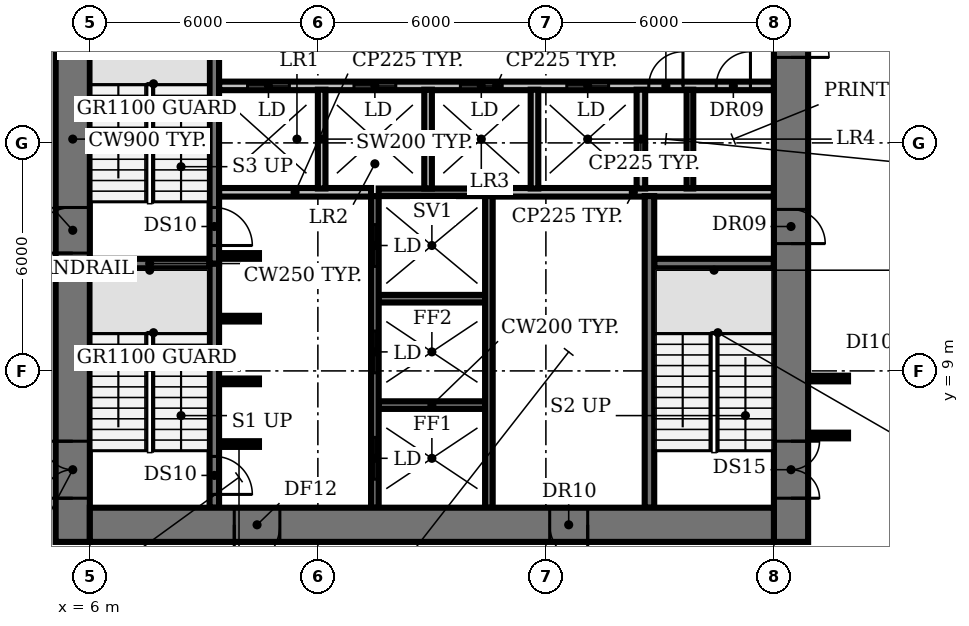
"""IFC4 building model, lengths in metres.
Left out: names, types, materials, properties, quantities, classifications, styles, units other than length and angle.
Written with IfcOpenShell. Run it as: python <this file> out.ifc"""

import sys

from ifc_helpers import new_model, si_unit, direction, frame, frame_2d, origin, place, context, subcontext, project, spatial, rectangle, extrude, element, fill, save


model = new_model("IFC4")
c1 = context("Model", 3, precision=1e-05, world=origin(), true_north=direction((0.0, 1.0)))
c2 = subcontext(c1, "Body", "Model", "MODEL_VIEW")
j1 = project(units=[si_unit("LENGTHUNIT", "METRE"), si_unit("PLANEANGLEUNIT", "RADIAN")], contexts=[c1])
p1 = place(None, origin())
s1 = spatial("IfcSite", under=j1, at=p1, CompositionType="ELEMENT")
p2 = place(p1, origin())
s2 = spatial("IfcBuilding", under=s1, at=p2, CompositionType="ELEMENT")
p3 = place(p2, frame((0.0, 0.0, 66.8)))
s3 = spatial("IfcBuildingStorey", under=s2, at=p3, CompositionType="ELEMENT", Elevation=66.8)
p4 = place(p3, frame((9.4, 7.075, 0.0), z_axis=(0.0, 0.0, 1.0), x_axis=(1.0, 0.0, 0.0)))
e1 = element("IfcWall", 1, at=p4, inside=s3, PredefinedType="SHEAR", context=c2, shape_type="SweptSolid", body=[
    extrude(rectangle(XDim=1.05, YDim=0.15, at=frame_2d((0.525, 0.0))), origin(), (0.0, 0.0, 1.0), 3.85),
])
p5 = place(p3, frame((13.6, 8.1, 0.0), z_axis=(0.0, 0.0, 1.0), x_axis=(1.0, 0.0, 0.0)))
e2 = element("IfcWall", 2, at=p5, inside=s3, PredefinedType="SHEAR", context=c2, shape_type="SweptSolid", body=[
    extrude(rectangle(XDim=2.8, YDim=0.2, at=frame_2d((1.4, 0.0))), origin(), (0.0, 0.0, 1.0), 3.85),
])
for number, where, z_axis, x_axis in (
    (3, (9.4, 8.725, 0.0), (0.0, 0.0, 1.0), (1.0, 0.0, 0.0)),
    (4, (9.4, 10.375, 0.0), (0.0, 0.0, 1.0), (1.0, 0.0, 0.0)),
):
    element("IfcWall", number, at=place(p3, frame(where, z_axis=z_axis, x_axis=x_axis)), inside=s3, PredefinedType="SHEAR", context=c2, shape_type="SweptSolid", body=[
        extrude(rectangle(XDim=1.05, YDim=0.15, at=frame_2d((0.525, 0.0))), origin(), (0.0, 0.0, 1.0), 3.85),
    ])
p6 = place(p3, frame((13.6, 10.9, 0.0), z_axis=(0.0, 0.0, 1.0), x_axis=(1.0, 0.0, 0.0)))
e5 = element("IfcWall", 5, at=p6, inside=s3, PredefinedType="SHEAR", context=c2, shape_type="SweptSolid", body=[
    extrude(rectangle(XDim=2.8, YDim=0.2, at=frame_2d((1.4, 0.0))), origin(), (0.0, 0.0, 1.0), 3.85),
])
for number, where, z_axis, x_axis in (
    (6, (6.0, 11.825, 0.0), (0.0, 0.0, 1.0), (1.0, 0.0, 0.0)),
    (7, (20.85, 11.825, 0.0), (0.0, 0.0, 1.0), (1.0, 0.0, 0.0)),
):
    element("IfcWall", number, at=place(p3, frame(where, z_axis=z_axis, x_axis=x_axis)), inside=s3, PredefinedType="SHEAR", context=c2, shape_type="SweptSolid", body=[
        extrude(rectangle(XDim=3.15, YDim=0.25, at=frame_2d((1.575, 0.0))), origin(), (0.0, 0.0, 1.0), 3.85),
    ])
p7 = place(p3, frame((9.4, 12.025, 0.0), z_axis=(0.0, 0.0, 1.0), x_axis=(1.0, 0.0, 0.0)))
e8 = element("IfcWall", 8, at=p7, inside=s3, PredefinedType="SHEAR", context=c2, shape_type="SweptSolid", body=[
    extrude(rectangle(XDim=1.05, YDim=0.15, at=frame_2d((0.525, 0.0))), origin(), (0.0, 0.0, 1.0), 3.85),
])
p8 = place(p3, frame((9.4, 13.7, 0.0), z_axis=(0.0, 0.0, 1.0), x_axis=(1.0, 0.0, 0.0)))
e9 = element("IfcWall", 9, at=p8, inside=s3, PredefinedType="PARTITIONING", context=c2, shape_type="SweptSolid", body=[
    extrude(rectangle(XDim=4.0, YDim=0.225, at=frame_2d((2.0, 0.0))), origin(), (0.0, 0.0, 1.0), 3.85),
])
p9 = place(p3, frame((13.6, 13.7, 0.0), z_axis=(0.0, 0.0, 1.0), x_axis=(1.0, 0.0, 0.0)))
e10 = element("IfcWall", 10, at=p9, inside=s3, PredefinedType="SHEAR", context=c2, shape_type="SweptSolid", body=[
    extrude(rectangle(XDim=2.8, YDim=0.2, at=frame_2d((1.4, 0.0))), origin(), (0.0, 0.0, 1.0), 3.85),
])
p10 = place(p3, frame((16.6, 13.7, 0.0), z_axis=(0.0, 0.0, 1.0), x_axis=(1.0, 0.0, 0.0)))
e11 = element("IfcWall", 11, at=p10, inside=s3, PredefinedType="PARTITIONING", context=c2, shape_type="SweptSolid", body=[
    extrude(rectangle(XDim=7.4, YDim=0.225, at=frame_2d((3.7, 0.0))), origin(), (0.0, 0.0, 1.0), 3.85),
])
p11 = place(p3, frame((9.4, 16.5, 0.0), z_axis=(0.0, 0.0, 1.0), x_axis=(1.0, 0.0, 0.0)))
e12 = element("IfcWall", 12, at=p11, inside=s3, PredefinedType="PARTITIONING", context=c2, shape_type="SweptSolid", body=[
    extrude(rectangle(XDim=14.6, YDim=0.225, at=frame_2d((7.3, 0.0))), origin(), (0.0, 0.0, 1.0), 3.85),
])
p12 = place(p11, frame((0.75, 0.0, 0.0)))
e13 = element("IfcOpeningElement", 13, at=p12, cuts=e12, PredefinedType="OPENING", context=c2, shape_type="SweptSolid", body=[
    extrude(rectangle(XDim=1.1, YDim=2.1, at=frame_2d((0.55, 1.05))), frame((0.0, 0.123, 0.0), z_axis=(0.0, -1.0, 0.0), x_axis=(1.0, 0.0, 0.0)), (0.0, 0.0, 1.0), 0.245),
])
p13 = place(p11, frame((3.55, 0.0, 0.0)))
e14 = element("IfcOpeningElement", 14, at=p13, cuts=e12, PredefinedType="OPENING", context=c2, shape_type="SweptSolid", body=[
    extrude(rectangle(XDim=1.1, YDim=2.1, at=frame_2d((0.55, 1.05))), frame((0.0, 0.123, 0.0), z_axis=(0.0, -1.0, 0.0), x_axis=(1.0, 0.0, 0.0)), (0.0, 0.0, 1.0), 0.245),
])
p14 = place(p11, frame((6.35, 0.0, 0.0)))
e15 = element("IfcOpeningElement", 15, at=p14, cuts=e12, PredefinedType="OPENING", context=c2, shape_type="SweptSolid", body=[
    extrude(rectangle(XDim=1.1, YDim=2.1, at=frame_2d((0.55, 1.05))), frame((0.0, 0.123, 0.0), z_axis=(0.0, -1.0, 0.0), x_axis=(1.0, 0.0, 0.0)), (0.0, 0.0, 1.0), 0.245),
])
p15 = place(p11, frame((9.15, 0.0, 0.0)))
e16 = element("IfcOpeningElement", 16, at=p15, cuts=e12, PredefinedType="OPENING", context=c2, shape_type="SweptSolid", body=[
    extrude(rectangle(XDim=1.1, YDim=2.1, at=frame_2d((0.55, 1.05))), frame((0.0, 0.123, 0.0), z_axis=(0.0, -1.0, 0.0), x_axis=(1.0, 0.0, 0.0)), (0.0, 0.0, 1.0), 0.245),
])
p16 = place(p11, frame((11.308, 0.0, 0.0)))
e17 = element("IfcOpeningElement", 17, at=p16, cuts=e12, PredefinedType="OPENING", context=c2, shape_type="SweptSolid", body=[
    extrude(rectangle(XDim=0.9, YDim=2.1, at=frame_2d((0.45, 1.05))), frame((0.0, 0.123, 0.0), z_axis=(0.0, -1.0, 0.0), x_axis=(1.0, 0.0, 0.0)), (0.0, 0.0, 1.0), 0.245),
])
p17 = place(p11, frame((13.083, 0.0, 0.0)))
e18 = element("IfcOpeningElement", 18, at=p17, cuts=e12, PredefinedType="OPENING", context=c2, shape_type="SweptSolid", body=[
    extrude(rectangle(XDim=0.9, YDim=2.1, at=frame_2d((0.45, 1.05))), frame((0.0, 0.123, 0.0), z_axis=(0.0, -1.0, 0.0), x_axis=(1.0, 0.0, 0.0)), (0.0, 0.0, 1.0), 0.245),
])
p18 = place(p3, frame((9.275, 11.825, 0.0), z_axis=(0.0, 0.0, 1.0), x_axis=(0.0, -1.0, 0.0)))
e19 = element("IfcWall", 19, at=p18, inside=s3, PredefinedType="SHEAR", context=c2, shape_type="SweptSolid", body=[
    extrude(rectangle(XDim=6.425, YDim=0.25, at=frame_2d((3.212, 0.0))), origin(), (0.0, 0.0, 1.0), 3.85),
])
p19 = place(p18, frame((5.075, 0.0, 0.0)))
e20 = element("IfcOpeningElement", 20, at=p19, cuts=e19, PredefinedType="OPENING", context=c2, shape_type="SweptSolid", body=[
    extrude(rectangle(XDim=1.0, YDim=2.1, at=frame_2d((0.5, 1.05))), frame((0.0, 0.135, 0.0), z_axis=(0.0, -1.0, 0.0), x_axis=(1.0, 0.0, 0.0)), (0.0, 0.0, 1.0), 0.27),
])
p20 = place(p3, frame((9.275, 18.375, 0.0), z_axis=(0.0, 0.0, 1.0), x_axis=(0.0, -1.0, 0.0)))
e21 = element("IfcWall", 21, at=p20, inside=s3, PredefinedType="SHEAR", context=c2, shape_type="SweptSolid", body=[
    extrude(rectangle(XDim=6.55, YDim=0.25, at=frame_2d((3.275, 0.0))), origin(), (0.0, 0.0, 1.0), 3.85),
])
p21 = place(p20, frame((5.075, 0.0, 0.0)))
e22 = element("IfcOpeningElement", 22, at=p21, cuts=e21, PredefinedType="OPENING", context=c2, shape_type="SweptSolid", body=[
    extrude(rectangle(XDim=1.0, YDim=2.1, at=frame_2d((0.5, 1.05))), frame((0.0, 0.135, 0.0), z_axis=(0.0, -1.0, 0.0), x_axis=(1.0, 0.0, 0.0)), (0.0, 0.0, 1.0), 0.27),
])
p22 = place(p3, frame((12.1, 13.8, 0.0), z_axis=(0.0, 0.0, 1.0), x_axis=(0.0, 1.0, 0.0)))
e23 = element("IfcWall", 23, at=p22, inside=s3, PredefinedType="SOLIDWALL", context=c2, shape_type="SweptSolid", body=[
    extrude(rectangle(XDim=2.6, YDim=0.2, at=frame_2d((1.3, 0.0))), origin(), (0.0, 0.0, 1.0), 3.85),
])
p23 = place(p3, frame((13.5, 5.4, 0.0), z_axis=(0.0, 0.0, 1.0), x_axis=(0.0, 1.0, 0.0)))
e24 = element("IfcWall", 24, at=p23, inside=s3, PredefinedType="SHEAR", context=c2, shape_type="SweptSolid", body=[
    extrude(rectangle(XDim=8.2, YDim=0.2, at=frame_2d((4.1, 0.0))), origin(), (0.0, 0.0, 1.0), 3.85),
])
p24 = place(p23, frame((0.75, 0.0, 0.0)))
e25 = element("IfcOpeningElement", 25, at=p24, cuts=e24, PredefinedType="OPENING", context=c2, shape_type="SweptSolid", body=[
    extrude(rectangle(XDim=1.1, YDim=2.1, at=frame_2d((0.55, 1.05))), frame((0.0, 0.11, 0.0), z_axis=(0.0, -1.0, 0.0), x_axis=(1.0, 0.0, 0.0)), (0.0, 0.0, 1.0), 0.22),
])
p25 = place(p23, frame((3.55, 0.0, 0.0)))
e26 = element("IfcOpeningElement", 26, at=p25, cuts=e24, PredefinedType="OPENING", context=c2, shape_type="SweptSolid", body=[
    extrude(rectangle(XDim=1.1, YDim=2.1, at=frame_2d((0.55, 1.05))), frame((0.0, 0.11, 0.0), z_axis=(0.0, -1.0, 0.0), x_axis=(1.0, 0.0, 0.0)), (0.0, 0.0, 1.0), 0.22),
])
p26 = place(p23, frame((6.35, 0.0, 0.0)))
e27 = element("IfcOpeningElement", 27, at=p26, cuts=e24, PredefinedType="OPENING", context=c2, shape_type="SweptSolid", body=[
    extrude(rectangle(XDim=1.1, YDim=2.1, at=frame_2d((0.55, 1.05))), frame((0.0, 0.11, 0.0), z_axis=(0.0, -1.0, 0.0), x_axis=(1.0, 0.0, 0.0)), (0.0, 0.0, 1.0), 0.22),
])
p27 = place(p3, frame((14.9, 13.8, 0.0), z_axis=(0.0, 0.0, 1.0), x_axis=(0.0, 1.0, 0.0)))
e28 = element("IfcWall", 28, at=p27, inside=s3, PredefinedType="SOLIDWALL", context=c2, shape_type="SweptSolid", body=[
    extrude(rectangle(XDim=2.6, YDim=0.2, at=frame_2d((1.3, 0.0))), origin(), (0.0, 0.0, 1.0), 3.85),
])
p28 = place(p3, frame((16.5, 5.4, 0.0), z_axis=(0.0, 0.0, 1.0), x_axis=(0.0, 1.0, 0.0)))
e29 = element("IfcWall", 29, at=p28, inside=s3, PredefinedType="SHEAR", context=c2, shape_type="SweptSolid", body=[
    extrude(rectangle(XDim=8.2, YDim=0.2, at=frame_2d((4.1, 0.0))), origin(), (0.0, 0.0, 1.0), 3.85),
])
p29 = place(p3, frame((17.7, 13.8, 0.0), z_axis=(0.0, 0.0, 1.0), x_axis=(0.0, 1.0, 0.0)))
e30 = element("IfcWall", 30, at=p29, inside=s3, PredefinedType="SOLIDWALL", context=c2, shape_type="SweptSolid", body=[
    extrude(rectangle(XDim=2.6, YDim=0.2, at=frame_2d((1.3, 0.0))), origin(), (0.0, 0.0, 1.0), 3.85),
])
p30 = place(p3, frame((20.5, 13.8, 0.0), z_axis=(0.0, 0.0, 1.0), x_axis=(0.0, 1.0, 0.0)))
e31 = element("IfcWall", 31, at=p30, inside=s3, PredefinedType="PARTITIONING", context=c2, shape_type="SweptSolid", body=[
    extrude(rectangle(XDim=2.6, YDim=0.225, at=frame_2d((1.3, 0.0))), origin(), (0.0, 0.0, 1.0), 3.85),
])
p31 = place(p3, frame((20.725, 5.4, 0.0), z_axis=(0.0, 0.0, 1.0), x_axis=(0.0, 1.0, 0.0)))
e32 = element("IfcWall", 32, at=p31, inside=s3, PredefinedType="SHEAR", context=c2, shape_type="SweptSolid", body=[
    extrude(rectangle(XDim=8.2, YDim=0.25, at=frame_2d((4.1, 0.0))), origin(), (0.0, 0.0, 1.0), 3.85),
])
p32 = place(p3, frame((21.79, 13.8, 0.0), z_axis=(0.0, 0.0, 1.0), x_axis=(0.0, 1.0, 0.0)))
e33 = element("IfcWall", 33, at=p32, inside=s3, PredefinedType="PARTITIONING", context=c2, shape_type="SweptSolid", body=[
    extrude(rectangle(XDim=2.6, YDim=0.175, at=frame_2d((1.3, 0.0))), origin(), (0.0, 0.0, 1.0), 3.85),
])
p33 = place(p3, frame((5.55, 4.5, 0.0), z_axis=(0.0, 0.0, 1.0), x_axis=(0.0, 1.0, 0.0)))
e34 = element("IfcWall", 34, at=p33, inside=s3, PredefinedType="SHEAR", context=c2, shape_type="SweptSolid", body=[
    extrude(rectangle(XDim=21.2, YDim=0.9, at=frame_2d((10.6, 0.0))), origin(), (0.0, 0.0, 1.0), 3.85),
])
p34 = place(p33, frame((1.15, 0.0, 0.0)))
e35 = element("IfcOpeningElement", 35, at=p34, cuts=e34, PredefinedType="OPENING", context=c2, shape_type="SweptSolid", body=[
    extrude(rectangle(XDim=1.5, YDim=2.1, at=frame_2d((0.75, 1.05))), frame((0.0, 0.46, 0.0), z_axis=(0.0, -1.0, 0.0), x_axis=(1.0, 0.0, 0.0)), (0.0, 0.0, 1.0), 0.92),
])
p35 = place(p33, frame((7.6, 0.0, 0.0)))
e36 = element("IfcOpeningElement", 36, at=p35, cuts=e34, PredefinedType="OPENING", context=c2, shape_type="SweptSolid", body=[
    extrude(rectangle(XDim=1.2, YDim=2.1, at=frame_2d((0.6, 1.05))), frame((0.0, 0.46, 0.0), z_axis=(0.0, -1.0, 0.0), x_axis=(1.0, 0.0, 0.0)), (0.0, 0.0, 1.0), 0.92),
])
p36 = place(p33, frame((14.15, 0.0, 0.0)))
e37 = element("IfcOpeningElement", 37, at=p36, cuts=e34, PredefinedType="OPENING", context=c2, shape_type="SweptSolid", body=[
    extrude(rectangle(XDim=1.2, YDim=2.1, at=frame_2d((0.6, 1.05))), frame((0.0, 0.46, 0.0), z_axis=(0.0, -1.0, 0.0), x_axis=(1.0, 0.0, 0.0)), (0.0, 0.0, 1.0), 0.92),
])
p37 = place(p3, frame((24.45, 25.7, 0.0), z_axis=(0.0, 0.0, 1.0), x_axis=(0.0, -1.0, 0.0)))
e38 = element("IfcWall", 38, at=p37, inside=s3, PredefinedType="SHEAR", context=c2, shape_type="SweptSolid", body=[
    extrude(rectangle(XDim=21.2, YDim=0.9, at=frame_2d((10.6, 0.0))), origin(), (0.0, 0.0, 1.0), 3.85),
])
p38 = place(p37, frame((18.55, 0.0, 0.0)))
e39 = element("IfcOpeningElement", 39, at=p38, cuts=e38, PredefinedType="OPENING", context=c2, shape_type="SweptSolid", body=[
    extrude(rectangle(XDim=1.5, YDim=2.1, at=frame_2d((0.75, 1.05))), frame((0.0, 0.46, 0.0), z_axis=(0.0, -1.0, 0.0), x_axis=(1.0, 0.0, 0.0)), (0.0, 0.0, 1.0), 0.92),
])
p39 = place(p37, frame((12.45, 0.0, 0.0)))
e40 = element("IfcOpeningElement", 40, at=p39, cuts=e38, PredefinedType="OPENING", context=c2, shape_type="SweptSolid", body=[
    extrude(rectangle(XDim=0.9, YDim=2.1, at=frame_2d((0.45, 1.05))), frame((0.0, 0.46, 0.0), z_axis=(0.0, -1.0, 0.0), x_axis=(1.0, 0.0, 0.0)), (0.0, 0.0, 1.0), 0.92),
])
p40 = place(p37, frame((6.45, 0.0, 0.0)))
e41 = element("IfcOpeningElement", 41, at=p40, cuts=e38, PredefinedType="OPENING", context=c2, shape_type="SweptSolid", body=[
    extrude(rectangle(XDim=2.0, YDim=2.1, at=frame_2d((1.0, 1.05))), frame((0.0, 0.46, 0.0), z_axis=(0.0, -1.0, 0.0), x_axis=(1.0, 0.0, 0.0)), (0.0, 0.0, 1.0), 0.92),
])
p41 = place(p3, frame((24.0, 4.95, 0.0), z_axis=(0.0, 0.0, 1.0), x_axis=(-1.0, 0.0, 0.0)))
e42 = element("IfcWall", 42, at=p41, inside=s3, PredefinedType="SHEAR", context=c2, shape_type="SweptSolid", body=[
    extrude(rectangle(XDim=18.0, YDim=0.9, at=frame_2d((9.0, 0.0))), origin(), (0.0, 0.0, 1.0), 3.85),
])
p42 = place(p41, frame((13.0, 0.0, 0.0)))
e43 = element("IfcOpeningElement", 43, at=p42, cuts=e42, PredefinedType="OPENING", context=c2, shape_type="SweptSolid", body=[
    extrude(rectangle(XDim=1.2, YDim=2.1, at=frame_2d((0.6, 1.05))), frame((0.0, 0.46, 0.0), z_axis=(0.0, -1.0, 0.0), x_axis=(1.0, 0.0, 0.0)), (0.0, 0.0, 1.0), 0.92),
])
p43 = place(p41, frame((4.9, 0.0, 0.0)))
e44 = element("IfcOpeningElement", 44, at=p43, cuts=e42, PredefinedType="OPENING", context=c2, shape_type="SweptSolid", body=[
    extrude(rectangle(XDim=1.0, YDim=2.1, at=frame_2d((0.5, 1.05))), frame((0.0, 0.46, 0.0), z_axis=(0.0, -1.0, 0.0), x_axis=(1.0, 0.0, 0.0)), (0.0, 0.0, 1.0), 0.92),
])
for number, where, z_axis, x_axis in (
    (45, (24.9, 7.3, 0.0), (0.0, 0.0, 1.0), (1.0, 0.0, 0.0)),
    (46, (24.9, 8.8, 0.0), (0.0, 0.0, 1.0), (1.0, 0.0, 0.0)),
):
    element("IfcWall", number, at=place(p3, frame(where, z_axis=z_axis, x_axis=x_axis)), inside=s3, PredefinedType="PARTITIONING", context=c2, shape_type="SweptSolid", body=[
        extrude(rectangle(XDim=1.05, YDim=0.15, at=frame_2d((0.525, 0.0))), origin(), (0.0, 0.0, 1.0), 2.83),
    ])
p44 = place(p12, origin())
e47 = element("IfcDoor", 47, at=p44, inside=s3, OperationType="DOUBLE_DOOR_SLIDING", PredefinedType="DOOR", context=c2, shape_type="SweptSolid", body=[
    extrude(rectangle(XDim=1.1, YDim=2.1, at=frame_2d((0.55, 1.05))), frame((0.0, 0.025, 0.0), z_axis=(0.0, -1.0, 0.0), x_axis=(1.0, 0.0, 0.0)), (0.0, 0.0, 1.0), 0.05),
])
fill(e13, e47)
p45 = place(p13, origin())
e48 = element("IfcDoor", 48, at=p45, inside=s3, OperationType="DOUBLE_DOOR_SLIDING", PredefinedType="DOOR", context=c2, shape_type="SweptSolid", body=[
    extrude(rectangle(XDim=1.1, YDim=2.1, at=frame_2d((0.55, 1.05))), frame((0.0, 0.025, 0.0), z_axis=(0.0, -1.0, 0.0), x_axis=(1.0, 0.0, 0.0)), (0.0, 0.0, 1.0), 0.05),
])
fill(e14, e48)
p46 = place(p14, origin())
e49 = element("IfcDoor", 49, at=p46, inside=s3, OperationType="DOUBLE_DOOR_SLIDING", PredefinedType="DOOR", context=c2, shape_type="SweptSolid", body=[
    extrude(rectangle(XDim=1.1, YDim=2.1, at=frame_2d((0.55, 1.05))), frame((0.0, 0.025, 0.0), z_axis=(0.0, -1.0, 0.0), x_axis=(1.0, 0.0, 0.0)), (0.0, 0.0, 1.0), 0.05),
])
fill(e15, e49)
p47 = place(p15, origin())
e50 = element("IfcDoor", 50, at=p47, inside=s3, OperationType="DOUBLE_DOOR_SLIDING", PredefinedType="DOOR", context=c2, shape_type="SweptSolid", body=[
    extrude(rectangle(XDim=1.1, YDim=2.1, at=frame_2d((0.55, 1.05))), frame((0.0, 0.025, 0.0), z_axis=(0.0, -1.0, 0.0), x_axis=(1.0, 0.0, 0.0)), (0.0, 0.0, 1.0), 0.05),
])
fill(e16, e50)
p48 = place(p16, origin())
e51 = element("IfcDoor", 51, at=p48, inside=s3, OperationType="SINGLE_SWING_RIGHT", PredefinedType="DOOR", context=c2, shape_type="SweptSolid", body=[
    extrude(rectangle(XDim=0.9, YDim=2.1, at=frame_2d((0.45, 1.05))), frame((0.0, 0.025, 0.0), z_axis=(0.0, -1.0, 0.0), x_axis=(1.0, 0.0, 0.0)), (0.0, 0.0, 1.0), 0.05),
])
fill(e17, e51)
p49 = place(p17, origin())
e52 = element("IfcDoor", 52, at=p49, inside=s3, OperationType="SINGLE_SWING_RIGHT", PredefinedType="DOOR", context=c2, shape_type="SweptSolid", body=[
    extrude(rectangle(XDim=0.9, YDim=2.1, at=frame_2d((0.45, 1.05))), frame((0.0, 0.025, 0.0), z_axis=(0.0, -1.0, 0.0), x_axis=(1.0, 0.0, 0.0)), (0.0, 0.0, 1.0), 0.05),
])
fill(e18, e52)
p50 = place(p19, origin())
e53 = element("IfcDoor", 53, at=p50, inside=s3, OperationType="SINGLE_SWING_RIGHT", PredefinedType="DOOR", context=c2, shape_type="SweptSolid", body=[
    extrude(rectangle(XDim=1.0, YDim=2.1, at=frame_2d((0.5, 1.05))), frame((0.0, 0.025, 0.0), z_axis=(0.0, -1.0, 0.0), x_axis=(1.0, 0.0, 0.0)), (0.0, 0.0, 1.0), 0.05),
])
fill(e20, e53)
p51 = place(p21, origin())
e54 = element("IfcDoor", 54, at=p51, inside=s3, OperationType="SINGLE_SWING_RIGHT", PredefinedType="DOOR", context=c2, shape_type="SweptSolid", body=[
    extrude(rectangle(XDim=1.0, YDim=2.1, at=frame_2d((0.5, 1.05))), frame((0.0, 0.025, 0.0), z_axis=(0.0, -1.0, 0.0), x_axis=(1.0, 0.0, 0.0)), (0.0, 0.0, 1.0), 0.05),
])
fill(e22, e54)
p52 = place(p24, origin())
e55 = element("IfcDoor", 55, at=p52, inside=s3, OperationType="DOUBLE_DOOR_SLIDING", PredefinedType="DOOR", context=c2, shape_type="SweptSolid", body=[
    extrude(rectangle(XDim=1.1, YDim=2.1, at=frame_2d((0.55, 1.05))), frame((0.0, 0.025, 0.0), z_axis=(0.0, -1.0, 0.0), x_axis=(1.0, 0.0, 0.0)), (0.0, 0.0, 1.0), 0.05),
])
fill(e25, e55)
p53 = place(p25, origin())
e56 = element("IfcDoor", 56, at=p53, inside=s3, OperationType="DOUBLE_DOOR_SLIDING", PredefinedType="DOOR", context=c2, shape_type="SweptSolid", body=[
    extrude(rectangle(XDim=1.1, YDim=2.1, at=frame_2d((0.55, 1.05))), frame((0.0, 0.025, 0.0), z_axis=(0.0, -1.0, 0.0), x_axis=(1.0, 0.0, 0.0)), (0.0, 0.0, 1.0), 0.05),
])
fill(e26, e56)
p54 = place(p26, origin())
e57 = element("IfcDoor", 57, at=p54, inside=s3, OperationType="DOUBLE_DOOR_SLIDING", PredefinedType="DOOR", context=c2, shape_type="SweptSolid", body=[
    extrude(rectangle(XDim=1.1, YDim=2.1, at=frame_2d((0.55, 1.05))), frame((0.0, 0.025, 0.0), z_axis=(0.0, -1.0, 0.0), x_axis=(1.0, 0.0, 0.0)), (0.0, 0.0, 1.0), 0.05),
])
fill(e27, e57)
p55 = place(p34, origin())
e58 = element("IfcDoor", 58, at=p55, inside=s3, OperationType="DOUBLE_DOOR_SINGLE_SWING", PredefinedType="DOOR", context=c2, shape_type="SweptSolid", body=[
    extrude(rectangle(XDim=1.5, YDim=2.1, at=frame_2d((0.75, 1.05))), frame((0.0, 0.025, 0.0), z_axis=(0.0, -1.0, 0.0), x_axis=(1.0, 0.0, 0.0)), (0.0, 0.0, 1.0), 0.05),
])
fill(e35, e58)
p56 = place(p35, origin())
e59 = element("IfcDoor", 59, at=p56, inside=s3, OperationType="SINGLE_SWING_LEFT", PredefinedType="DOOR", context=c2, shape_type="SweptSolid", body=[
    extrude(rectangle(XDim=1.2, YDim=2.1, at=frame_2d((0.6, 1.05))), frame((0.0, 0.025, 0.0), z_axis=(0.0, -1.0, 0.0), x_axis=(1.0, 0.0, 0.0)), (0.0, 0.0, 1.0), 0.05),
])
fill(e36, e59)
p57 = place(p38, origin())
e60 = element("IfcDoor", 60, at=p57, inside=s3, OperationType="DOUBLE_DOOR_SINGLE_SWING", PredefinedType="DOOR", context=c2, shape_type="SweptSolid", body=[
    extrude(rectangle(XDim=1.5, YDim=2.1, at=frame_2d((0.75, 1.05))), frame((0.0, 0.025, 0.0), z_axis=(0.0, -1.0, 0.0), x_axis=(1.0, 0.0, 0.0)), (0.0, 0.0, 1.0), 0.05),
])
fill(e39, e60)
p58 = place(p39, origin())
e61 = element("IfcDoor", 61, at=p58, inside=s3, OperationType="SINGLE_SWING_RIGHT", PredefinedType="DOOR", context=c2, shape_type="SweptSolid", body=[
    extrude(rectangle(XDim=0.9, YDim=2.1, at=frame_2d((0.45, 1.05))), frame((0.0, -0.39, 0.0), z_axis=(0.0, -1.0, 0.0), x_axis=(1.0, 0.0, 0.0)), (0.0, 0.0, 1.0), 0.05),
])
fill(e40, e61)
p59 = place(p40, origin())
e62 = element("IfcDoor", 62, at=p59, inside=s3, OperationType="DOUBLE_DOOR_SINGLE_SWING", PredefinedType="DOOR", context=c2, shape_type="SweptSolid", body=[
    extrude(rectangle(XDim=2.0, YDim=2.1, at=frame_2d((1.0, 1.05))), frame((0.0, 0.025, 0.0), z_axis=(0.0, -1.0, 0.0), x_axis=(1.0, 0.0, 0.0)), (0.0, 0.0, 1.0), 0.05),
])
fill(e41, e62)
p60 = place(p42, origin())
e63 = element("IfcDoor", 63, at=p60, inside=s3, OperationType="SINGLE_SWING_RIGHT", PredefinedType="DOOR", context=c2, shape_type="SweptSolid", body=[
    extrude(rectangle(XDim=1.2, YDim=2.1, at=frame_2d((0.6, 1.05))), frame((0.0, 0.025, 0.0), z_axis=(0.0, -1.0, 0.0), x_axis=(1.0, 0.0, 0.0)), (0.0, 0.0, 1.0), 0.05),
])
fill(e43, e63)
p61 = place(p43, origin())
e64 = element("IfcDoor", 64, at=p61, inside=s3, OperationType="SINGLE_SWING_LEFT", PredefinedType="DOOR", context=c2, shape_type="SweptSolid", body=[
    extrude(rectangle(XDim=1.0, YDim=2.1, at=frame_2d((0.5, 1.05))), frame((0.0, -0.39, 0.0), z_axis=(0.0, -1.0, 0.0), x_axis=(1.0, 0.0, 0.0)), (0.0, 0.0, 1.0), 0.05),
])
fill(e44, e64)
save(model, sys.argv[1])
